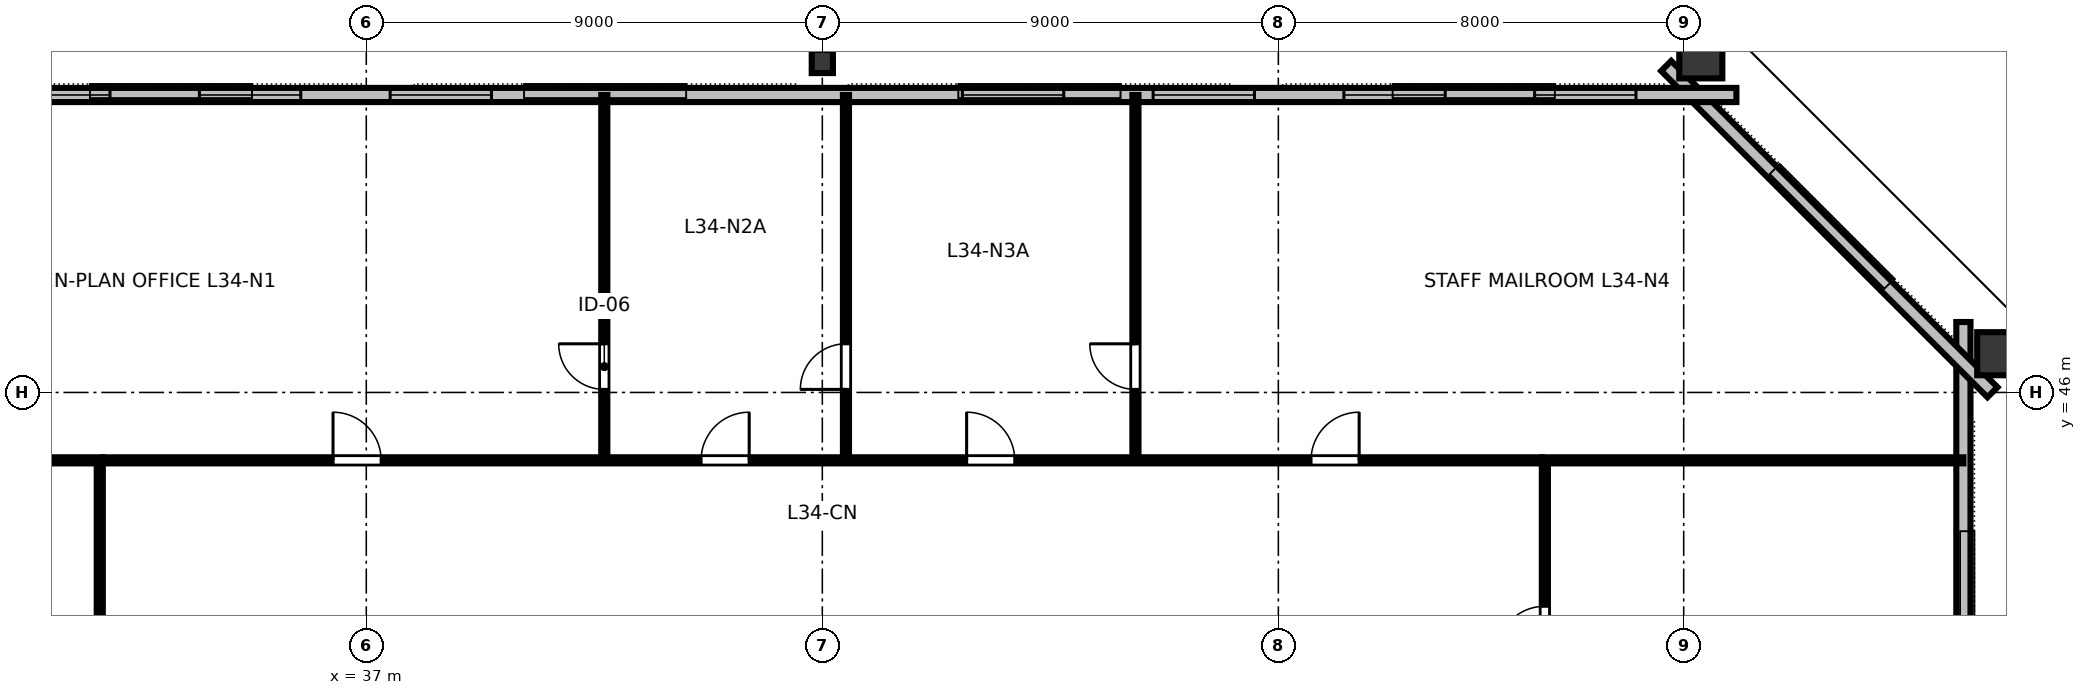
"""IFC4 building model, lengths in metres.
Left out: names, types, materials, properties, quantities, classifications, styles, units other than length and angle.
Written with IfcOpenShell. Run it as: python <this file> out.ifc"""

import sys

from ifc_helpers import new_model, si_unit, direction, frame, frame_2d, origin, origin_2d, place, context, subcontext, project, spatial, rectangle, hollow_rectangle, i_section, extrude, element, fill, save


model = new_model("IFC4")
c1 = context("Model", 3, precision=1e-05, world=origin(), true_north=direction((0.0, 1.0)))
c2 = subcontext(c1, "Body", "Model", "MODEL_VIEW")
j1 = project(units=[si_unit("LENGTHUNIT", "METRE"), si_unit("PLANEANGLEUNIT", "RADIAN")], contexts=[c1])
p1 = place(None, origin())
s1 = spatial("IfcSite", under=j1, at=p1, CompositionType="ELEMENT")
p2 = place(p1, origin())
s2 = spatial("IfcBuilding", under=s1, at=p2, CompositionType="ELEMENT")
p3 = place(p2, frame((0.0, 0.0, 131.2)))
s3 = spatial("IfcBuildingStorey", under=s2, at=p3, CompositionType="ELEMENT", Elevation=131.2)
for number, where, z_axis, x_axis in (
    (1, (69.292, 46.764, 0.0), (0.0, 0.0, 1.0), (0.0, 1.0, 0.0)),
    (2, (63.338, 52.698, 0.0), (0.0, 0.0, 1.0), (1.0, 0.0, 0.0)),
):
    element("IfcColumn", number, at=place(p3, frame(where, z_axis=z_axis, x_axis=x_axis)), inside=s3, PredefinedType="COLUMN", context=c2, shape_type="SweptSolid", body=[
        extrude(hollow_rectangle(XDim=0.85, YDim=1.0, WallThickness=0.05, at=origin_2d()), origin(), (0.0, 0.0, 1.0), 3.358),
    ])
p4 = place(p3, frame((46.0, 52.53, 0.0), z_axis=(0.0, 0.0, 1.0), x_axis=(1.0, 0.0, 0.0)))
e3 = element("IfcColumn", 3, at=p4, inside=s3, PredefinedType="COLUMN", context=c2, shape_type="SweptSolid", body=[
    extrude(i_section(OverallWidth=0.418, OverallDepth=0.455, WebThickness=0.042, FlangeThickness=0.068, FilletRadius=0.025, at=origin_2d()), origin(), (0.0, 0.0, 1.0), 3.358),
])
p5 = place(p3, frame((68.52, 16.61, 0.0), z_axis=(0.0, 0.0, 1.0), x_axis=(0.0, 1.0, 0.0)))
e4 = element("IfcWall", 4, at=p5, inside=s3, PredefinedType="STANDARD", context=c2, shape_type="SweptSolid", body=[
    extrude(rectangle(XDim=30.78, YDim=0.28, at=frame_2d((15.39, 0.0))), origin(), (0.0, 0.0, 1.0), 3.36),
])
p6 = place(p5, frame((6.224, 0.0, 0.8)))
e5 = element("IfcOpeningElement", 5, at=p6, cuts=e4, PredefinedType="OPENING", context=c2, shape_type="SweptSolid", body=[
    extrude(rectangle(XDim=2.0, YDim=1.95, at=frame_2d((1.0, 0.975))), frame((0.0, 0.15, 0.0), z_axis=(0.0, -1.0, 0.0), x_axis=(1.0, 0.0, 0.0)), (0.0, 0.0, 1.0), 0.3),
])
p7 = place(p5, frame((18.473, 0.0, 0.8)))
e6 = element("IfcOpeningElement", 6, at=p7, cuts=e4, PredefinedType="OPENING", context=c2, shape_type="SweptSolid", body=[
    extrude(rectangle(XDim=2.0, YDim=1.95, at=frame_2d((1.0, 0.975))), frame((0.0, 0.15, 0.0), z_axis=(0.0, -1.0, 0.0), x_axis=(1.0, 0.0, 0.0)), (0.0, 0.0, 1.0), 0.3),
])
p8 = place(p5, frame((22.556, 0.0, 0.8)))
e7 = element("IfcOpeningElement", 7, at=p8, cuts=e4, PredefinedType="OPENING", context=c2, shape_type="SweptSolid", body=[
    extrude(rectangle(XDim=2.0, YDim=1.95, at=frame_2d((1.0, 0.975))), frame((0.0, 0.15, 0.0), z_axis=(0.0, -1.0, 0.0), x_axis=(1.0, 0.0, 0.0)), (0.0, 0.0, 1.0), 0.3),
])
p9 = place(p3, frame((69.094, 46.004, 0.0), z_axis=(0.0, 0.0, 1.0), x_axis=(-0.707106781187, 0.707106781187, 0.0)))
e8 = element("IfcWall", 8, at=p9, inside=s3, PredefinedType="STANDARD", context=c2, shape_type="SweptSolid", body=[
    extrude(rectangle(XDim=9.107, YDim=0.28, at=frame_2d((4.553, 0.0))), origin(), (0.0, 0.0, 1.0), 3.36),
])
p10 = place(p3, frame((64.04, 51.87, 0.0), z_axis=(0.0, 0.0, 1.0), x_axis=(-1.0, 0.0, 0.0)))
e9 = element("IfcWall", 9, at=p10, inside=s3, PredefinedType="STANDARD", context=c2, shape_type="SweptSolid", body=[
    extrude(rectangle(XDim=36.08, YDim=0.28, at=frame_2d((18.04, 0.0))), origin(), (0.0, 0.0, 1.0), 3.36),
])
p11 = place(p10, frame((1.982, 0.0, 0.8)))
e10 = element("IfcOpeningElement", 10, at=p11, cuts=e9, PredefinedType="OPENING", context=c2, shape_type="SweptSolid", body=[
    extrude(rectangle(XDim=2.0, YDim=1.95, at=frame_2d((1.0, 0.975))), frame((0.0, 0.15, 0.0), z_axis=(0.0, -1.0, 0.0), x_axis=(1.0, 0.0, 0.0)), (0.0, 0.0, 1.0), 0.3),
])
p12 = place(p10, frame((5.747, 0.0, 0.8)))
e11 = element("IfcOpeningElement", 11, at=p12, cuts=e9, PredefinedType="OPENING", context=c2, shape_type="SweptSolid", body=[
    extrude(rectangle(XDim=2.0, YDim=1.95, at=frame_2d((1.0, 0.975))), frame((0.0, 0.15, 0.0), z_axis=(0.0, -1.0, 0.0), x_axis=(1.0, 0.0, 0.0)), (0.0, 0.0, 1.0), 0.3),
])
p13 = place(p10, frame((9.511, 0.0, 0.8)))
e12 = element("IfcOpeningElement", 12, at=p13, cuts=e9, PredefinedType="OPENING", context=c2, shape_type="SweptSolid", body=[
    extrude(rectangle(XDim=2.0, YDim=1.95, at=frame_2d((1.0, 0.975))), frame((0.0, 0.15, 0.0), z_axis=(0.0, -1.0, 0.0), x_axis=(1.0, 0.0, 0.0)), (0.0, 0.0, 1.0), 0.3),
])
p14 = place(p10, frame((13.276, 0.0, 0.8)))
e13 = element("IfcOpeningElement", 13, at=p14, cuts=e9, PredefinedType="OPENING", context=c2, shape_type="SweptSolid", body=[
    extrude(rectangle(XDim=2.0, YDim=1.95, at=frame_2d((1.0, 0.975))), frame((0.0, 0.15, 0.0), z_axis=(0.0, -1.0, 0.0), x_axis=(1.0, 0.0, 0.0)), (0.0, 0.0, 1.0), 0.3),
])
p15 = place(p10, frame((24.569, 0.0, 0.8)))
e14 = element("IfcOpeningElement", 14, at=p15, cuts=e9, PredefinedType="OPENING", context=c2, shape_type="SweptSolid", body=[
    extrude(rectangle(XDim=2.0, YDim=1.95, at=frame_2d((1.0, 0.975))), frame((0.0, 0.15, 0.0), z_axis=(0.0, -1.0, 0.0), x_axis=(1.0, 0.0, 0.0)), (0.0, 0.0, 1.0), 0.3),
])
p16 = place(p10, frame((28.333, 0.0, 0.8)))
e15 = element("IfcOpeningElement", 15, at=p16, cuts=e9, PredefinedType="OPENING", context=c2, shape_type="SweptSolid", body=[
    extrude(rectangle(XDim=2.0, YDim=1.95, at=frame_2d((1.0, 0.975))), frame((0.0, 0.15, 0.0), z_axis=(0.0, -1.0, 0.0), x_axis=(1.0, 0.0, 0.0)), (0.0, 0.0, 1.0), 0.3),
])
p17 = place(p10, frame((32.098, 0.0, 0.8)))
e16 = element("IfcOpeningElement", 16, at=p17, cuts=e9, PredefinedType="OPENING", context=c2, shape_type="SweptSolid", body=[
    extrude(rectangle(XDim=2.0, YDim=1.95, at=frame_2d((1.0, 0.975))), frame((0.0, 0.15, 0.0), z_axis=(0.0, -1.0, 0.0), x_axis=(1.0, 0.0, 0.0)), (0.0, 0.0, 1.0), 0.3),
])
p18 = place(p3, frame((41.697, 44.66, 0.0), z_axis=(0.0, 0.0, 1.0), x_axis=(0.0, 1.0, 0.0)))
e17 = element("IfcWall", 17, at=p18, inside=s3, PredefinedType="PARTITIONING", context=c2, shape_type="SweptSolid", body=[
    extrude(rectangle(XDim=7.21, YDim=0.12, at=frame_2d((3.605, 0.0))), origin(), (0.0, 0.0, 1.0), 2.64),
])
p19 = place(p18, frame((1.4, 0.0, 0.0)))
e18 = element("IfcOpeningElement", 18, at=p19, cuts=e17, PredefinedType="OPENING", context=c2, shape_type="SweptSolid", body=[
    extrude(rectangle(XDim=0.9, YDim=2.15, at=frame_2d((0.45, 1.075))), frame((0.0, 0.07, 0.0), z_axis=(0.0, -1.0, 0.0), x_axis=(1.0, 0.0, 0.0)), (0.0, 0.0, 1.0), 0.14),
])
p20 = place(p3, frame((46.467, 44.66, 0.0), z_axis=(0.0, 0.0, 1.0), x_axis=(0.0, 1.0, 0.0)))
e19 = element("IfcWall", 19, at=p20, inside=s3, PredefinedType="PARTITIONING", context=c2, shape_type="SweptSolid", body=[
    extrude(rectangle(XDim=7.21, YDim=0.12, at=frame_2d((3.605, 0.0))), origin(), (0.0, 0.0, 1.0), 2.64),
])
p21 = place(p20, frame((1.4, 0.0, 0.0)))
e20 = element("IfcOpeningElement", 20, at=p21, cuts=e19, PredefinedType="OPENING", context=c2, shape_type="SweptSolid", body=[
    extrude(rectangle(XDim=0.9, YDim=2.15, at=frame_2d((0.45, 1.075))), frame((0.0, 0.07, 0.0), z_axis=(0.0, -1.0, 0.0), x_axis=(1.0, 0.0, 0.0)), (0.0, 0.0, 1.0), 0.14),
])
p22 = place(p3, frame((52.179, 44.66, 0.0), z_axis=(0.0, 0.0, 1.0), x_axis=(0.0, 1.0, 0.0)))
e21 = element("IfcWall", 21, at=p22, inside=s3, PredefinedType="PARTITIONING", context=c2, shape_type="SweptSolid", body=[
    extrude(rectangle(XDim=7.21, YDim=0.12, at=frame_2d((3.605, 0.0))), origin(), (0.0, 0.0, 1.0), 2.64),
])
p23 = place(p22, frame((1.4, 0.0, 0.0)))
e22 = element("IfcOpeningElement", 22, at=p23, cuts=e21, PredefinedType="OPENING", context=c2, shape_type="SweptSolid", body=[
    extrude(rectangle(XDim=0.9, YDim=2.15, at=frame_2d((0.45, 1.075))), frame((0.0, 0.07, 0.0), z_axis=(0.0, -1.0, 0.0), x_axis=(1.0, 0.0, 0.0)), (0.0, 0.0, 1.0), 0.14),
])
p24 = place(p3, frame((31.8, 44.66, 0.0), z_axis=(0.0, 0.0, 1.0), x_axis=(1.0, 0.0, 0.0)))
e23 = element("IfcWall", 23, at=p24, inside=s3, PredefinedType="PARTITIONING", context=c2, shape_type="SweptSolid", body=[
    extrude(rectangle(XDim=28.4, YDim=0.12, at=frame_2d((14.2, 0.0))), origin(), (0.0, 0.0, 1.0), 2.64),
])
p25 = place(p24, frame((4.544, 0.0, 0.0)))
e24 = element("IfcOpeningElement", 24, at=p25, cuts=e23, PredefinedType="OPENING", context=c2, shape_type="SweptSolid", body=[
    extrude(rectangle(XDim=0.95, YDim=2.15, at=frame_2d((0.475, 1.075))), frame((0.0, 0.07, 0.0), z_axis=(0.0, -1.0, 0.0), x_axis=(1.0, 0.0, 0.0)), (0.0, 0.0, 1.0), 0.14),
])
p26 = place(p24, frame((11.807, 0.0, 0.0)))
e25 = element("IfcOpeningElement", 25, at=p26, cuts=e23, PredefinedType="OPENING", context=c2, shape_type="SweptSolid", body=[
    extrude(rectangle(XDim=0.95, YDim=2.15, at=frame_2d((0.475, 1.075))), frame((0.0, 0.07, 0.0), z_axis=(0.0, -1.0, 0.0), x_axis=(1.0, 0.0, 0.0)), (0.0, 0.0, 1.0), 0.14),
])
p27 = place(p24, frame((17.048, 0.0, 0.0)))
e26 = element("IfcOpeningElement", 26, at=p27, cuts=e23, PredefinedType="OPENING", context=c2, shape_type="SweptSolid", body=[
    extrude(rectangle(XDim=0.95, YDim=2.15, at=frame_2d((0.475, 1.075))), frame((0.0, 0.07, 0.0), z_axis=(0.0, -1.0, 0.0), x_axis=(1.0, 0.0, 0.0)), (0.0, 0.0, 1.0), 0.14),
])
p28 = place(p24, frame((23.845, 0.0, 0.0)))
e27 = element("IfcOpeningElement", 27, at=p28, cuts=e23, PredefinedType="OPENING", context=c2, shape_type="SweptSolid", body=[
    extrude(rectangle(XDim=0.95, YDim=2.15, at=frame_2d((0.475, 1.075))), frame((0.0, 0.07, 0.0), z_axis=(0.0, -1.0, 0.0), x_axis=(1.0, 0.0, 0.0)), (0.0, 0.0, 1.0), 0.14),
])
p29 = place(p3, frame((31.74, 33.02, 0.0), z_axis=(0.0, 0.0, 1.0), x_axis=(0.0, 1.0, 0.0)))
e28 = element("IfcWall", 28, at=p29, inside=s3, PredefinedType="PARTITIONING", context=c2, shape_type="SweptSolid", body=[
    extrude(rectangle(XDim=11.58, YDim=0.12, at=frame_2d((5.79, 0.0))), origin(), (0.0, 0.0, 1.0), 2.64),
])
p30 = place(p29, frame((5.215, 0.0, 0.0)))
e29 = element("IfcOpeningElement", 29, at=p30, cuts=e28, PredefinedType="OPENING", context=c2, shape_type="SweptSolid", body=[
    extrude(rectangle(XDim=0.95, YDim=2.15, at=frame_2d((0.475, 1.075))), frame((0.0, 0.07, 0.0), z_axis=(0.0, -1.0, 0.0), x_axis=(1.0, 0.0, 0.0)), (0.0, 0.0, 1.0), 0.14),
])
p31 = place(p3, frame((60.26, 33.02, 0.0), z_axis=(0.0, 0.0, 1.0), x_axis=(0.0, 1.0, 0.0)))
e30 = element("IfcWall", 30, at=p31, inside=s3, PredefinedType="PARTITIONING", context=c2, shape_type="SweptSolid", body=[
    extrude(rectangle(XDim=11.58, YDim=0.12, at=frame_2d((5.79, 0.0))), origin(), (0.0, 0.0, 1.0), 2.64),
])
p32 = place(p31, frame((2.121, 0.0, 0.0)))
e31 = element("IfcOpeningElement", 31, at=p32, cuts=e30, PredefinedType="OPENING", context=c2, shape_type="SweptSolid", body=[
    extrude(rectangle(XDim=0.95, YDim=2.15, at=frame_2d((0.475, 1.075))), frame((0.0, 0.07, 0.0), z_axis=(0.0, -1.0, 0.0), x_axis=(1.0, 0.0, 0.0)), (0.0, 0.0, 1.0), 0.14),
])
p33 = place(p31, frame((7.811, 0.0, 0.0)))
e32 = element("IfcOpeningElement", 32, at=p33, cuts=e30, PredefinedType="OPENING", context=c2, shape_type="SweptSolid", body=[
    extrude(rectangle(XDim=0.95, YDim=2.15, at=frame_2d((0.475, 1.075))), frame((0.0, 0.07, 0.0), z_axis=(0.0, -1.0, 0.0), x_axis=(1.0, 0.0, 0.0)), (0.0, 0.0, 1.0), 0.14),
])
for number, where, z_axis, x_axis in (
    (33, (31.8, 44.66, 0.0), (0.0, 0.0, 1.0), (-1.0, 0.0, 0.0)),
    (34, (60.2, 44.66, 0.0), (0.0, 0.0, 1.0), (1.0, 0.0, 0.0)),
):
    element("IfcWall", number, at=place(p3, frame(where, z_axis=z_axis, x_axis=x_axis)), inside=s3, PredefinedType="PARTITIONING", context=c2, shape_type="SweptSolid", body=[
        extrude(rectangle(XDim=8.32, YDim=0.12, at=frame_2d((4.16, 0.0))), origin(), (0.0, 0.0, 1.0), 2.64),
    ])
p34 = place(p11, origin())
e35 = element("IfcWindow", 35, at=p34, inside=s3, PartitioningType="SINGLE_PANEL", PredefinedType="WINDOW", context=c2, shape_type="SweptSolid", body=[
    extrude(rectangle(XDim=2.0, YDim=1.95, at=frame_2d((1.0, 0.975))), frame((0.0, 0.03, 0.0), z_axis=(0.0, -1.0, 0.0), x_axis=(1.0, 0.0, 0.0)), (0.0, 0.0, 1.0), 0.06),
])
fill(e10, e35)
p35 = place(p12, origin())
e36 = element("IfcWindow", 36, at=p35, inside=s3, PartitioningType="SINGLE_PANEL", PredefinedType="WINDOW", context=c2, shape_type="SweptSolid", body=[
    extrude(rectangle(XDim=2.0, YDim=1.95, at=frame_2d((1.0, 0.975))), frame((0.0, 0.03, 0.0), z_axis=(0.0, -1.0, 0.0), x_axis=(1.0, 0.0, 0.0)), (0.0, 0.0, 1.0), 0.06),
])
fill(e11, e36)
p36 = place(p13, origin())
e37 = element("IfcWindow", 37, at=p36, inside=s3, PartitioningType="SINGLE_PANEL", PredefinedType="WINDOW", context=c2, shape_type="SweptSolid", body=[
    extrude(rectangle(XDim=2.0, YDim=1.95, at=frame_2d((1.0, 0.975))), frame((0.0, 0.03, 0.0), z_axis=(0.0, -1.0, 0.0), x_axis=(1.0, 0.0, 0.0)), (0.0, 0.0, 1.0), 0.06),
])
fill(e12, e37)
p37 = place(p14, origin())
e38 = element("IfcWindow", 38, at=p37, inside=s3, PartitioningType="SINGLE_PANEL", PredefinedType="WINDOW", context=c2, shape_type="SweptSolid", body=[
    extrude(rectangle(XDim=2.0, YDim=1.95, at=frame_2d((1.0, 0.975))), frame((0.0, 0.03, 0.0), z_axis=(0.0, -1.0, 0.0), x_axis=(1.0, 0.0, 0.0)), (0.0, 0.0, 1.0), 0.06),
])
fill(e13, e38)
p38 = place(p15, origin())
e39 = element("IfcWindow", 39, at=p38, inside=s3, PartitioningType="SINGLE_PANEL", PredefinedType="WINDOW", context=c2, shape_type="SweptSolid", body=[
    extrude(rectangle(XDim=2.0, YDim=1.95, at=frame_2d((1.0, 0.975))), frame((0.0, 0.03, 0.0), z_axis=(0.0, -1.0, 0.0), x_axis=(1.0, 0.0, 0.0)), (0.0, 0.0, 1.0), 0.06),
])
fill(e14, e39)
p39 = place(p16, origin())
e40 = element("IfcWindow", 40, at=p39, inside=s3, PartitioningType="SINGLE_PANEL", PredefinedType="WINDOW", context=c2, shape_type="SweptSolid", body=[
    extrude(rectangle(XDim=2.0, YDim=1.95, at=frame_2d((1.0, 0.975))), frame((0.0, 0.03, 0.0), z_axis=(0.0, -1.0, 0.0), x_axis=(1.0, 0.0, 0.0)), (0.0, 0.0, 1.0), 0.06),
])
fill(e15, e40)
p40 = place(p17, origin())
e41 = element("IfcWindow", 41, at=p40, inside=s3, PartitioningType="SINGLE_PANEL", PredefinedType="WINDOW", context=c2, shape_type="SweptSolid", body=[
    extrude(rectangle(XDim=2.0, YDim=1.95, at=frame_2d((1.0, 0.975))), frame((0.0, 0.03, 0.0), z_axis=(0.0, -1.0, 0.0), x_axis=(1.0, 0.0, 0.0)), (0.0, 0.0, 1.0), 0.06),
])
fill(e16, e41)
p41 = place(p19, origin())
e42 = element("IfcDoor", 42, at=p41, inside=s3, OperationType="SINGLE_SWING_RIGHT", PredefinedType="DOOR", context=c2, shape_type="SweptSolid", body=[
    extrude(rectangle(XDim=0.9, YDim=2.15, at=frame_2d((0.45, 1.075))), frame((0.0, 0.025, 0.0), z_axis=(0.0, -1.0, 0.0), x_axis=(1.0, 0.0, 0.0)), (0.0, 0.0, 1.0), 0.05),
])
fill(e18, e42)
p42 = place(p21, origin())
e43 = element("IfcDoor", 43, at=p42, inside=s3, OperationType="SINGLE_SWING_LEFT", PredefinedType="DOOR", context=c2, shape_type="SweptSolid", body=[
    extrude(rectangle(XDim=0.9, YDim=2.15, at=frame_2d((0.45, 1.075))), frame((0.0, 0.025, 0.0), z_axis=(0.0, -1.0, 0.0), x_axis=(1.0, 0.0, 0.0)), (0.0, 0.0, 1.0), 0.05),
])
fill(e20, e43)
p43 = place(p23, origin())
e44 = element("IfcDoor", 44, at=p43, inside=s3, OperationType="SINGLE_SWING_RIGHT", PredefinedType="DOOR", context=c2, shape_type="SweptSolid", body=[
    extrude(rectangle(XDim=0.9, YDim=2.15, at=frame_2d((0.45, 1.075))), frame((0.0, 0.025, 0.0), z_axis=(0.0, -1.0, 0.0), x_axis=(1.0, 0.0, 0.0)), (0.0, 0.0, 1.0), 0.05),
])
fill(e22, e44)
p44 = place(p25, origin())
e45 = element("IfcDoor", 45, at=p44, inside=s3, OperationType="SINGLE_SWING_LEFT", PredefinedType="DOOR", context=c2, shape_type="SweptSolid", body=[
    extrude(rectangle(XDim=0.95, YDim=2.15, at=frame_2d((0.475, 1.075))), frame((0.0, 0.025, 0.0), z_axis=(0.0, -1.0, 0.0), x_axis=(1.0, 0.0, 0.0)), (0.0, 0.0, 1.0), 0.05),
])
fill(e24, e45)
p45 = place(p26, origin())
e46 = element("IfcDoor", 46, at=p45, inside=s3, OperationType="SINGLE_SWING_RIGHT", PredefinedType="DOOR", context=c2, shape_type="SweptSolid", body=[
    extrude(rectangle(XDim=0.95, YDim=2.15, at=frame_2d((0.475, 1.075))), frame((0.0, 0.025, 0.0), z_axis=(0.0, -1.0, 0.0), x_axis=(1.0, 0.0, 0.0)), (0.0, 0.0, 1.0), 0.05),
])
fill(e25, e46)
p46 = place(p27, origin())
e47 = element("IfcDoor", 47, at=p46, inside=s3, OperationType="SINGLE_SWING_LEFT", PredefinedType="DOOR", context=c2, shape_type="SweptSolid", body=[
    extrude(rectangle(XDim=0.95, YDim=2.15, at=frame_2d((0.475, 1.075))), frame((0.0, 0.025, 0.0), z_axis=(0.0, -1.0, 0.0), x_axis=(1.0, 0.0, 0.0)), (0.0, 0.0, 1.0), 0.05),
])
fill(e26, e47)
p47 = place(p28, origin())
e48 = element("IfcDoor", 48, at=p47, inside=s3, OperationType="SINGLE_SWING_RIGHT", PredefinedType="DOOR", context=c2, shape_type="SweptSolid", body=[
    extrude(rectangle(XDim=0.95, YDim=2.15, at=frame_2d((0.475, 1.075))), frame((0.0, 0.025, 0.0), z_axis=(0.0, -1.0, 0.0), x_axis=(1.0, 0.0, 0.0)), (0.0, 0.0, 1.0), 0.05),
])
fill(e27, e48)
p48 = place(p33, origin())
e49 = element("IfcDoor", 49, at=p48, inside=s3, OperationType="SINGLE_SWING_LEFT", PredefinedType="DOOR", context=c2, shape_type="SweptSolid", body=[
    extrude(rectangle(XDim=0.95, YDim=2.15, at=frame_2d((0.475, 1.075))), frame((0.0, 0.025, 0.0), z_axis=(0.0, -1.0, 0.0), x_axis=(1.0, 0.0, 0.0)), (0.0, 0.0, 1.0), 0.05),
])
fill(e32, e49)
save(model, sys.argv[1])
